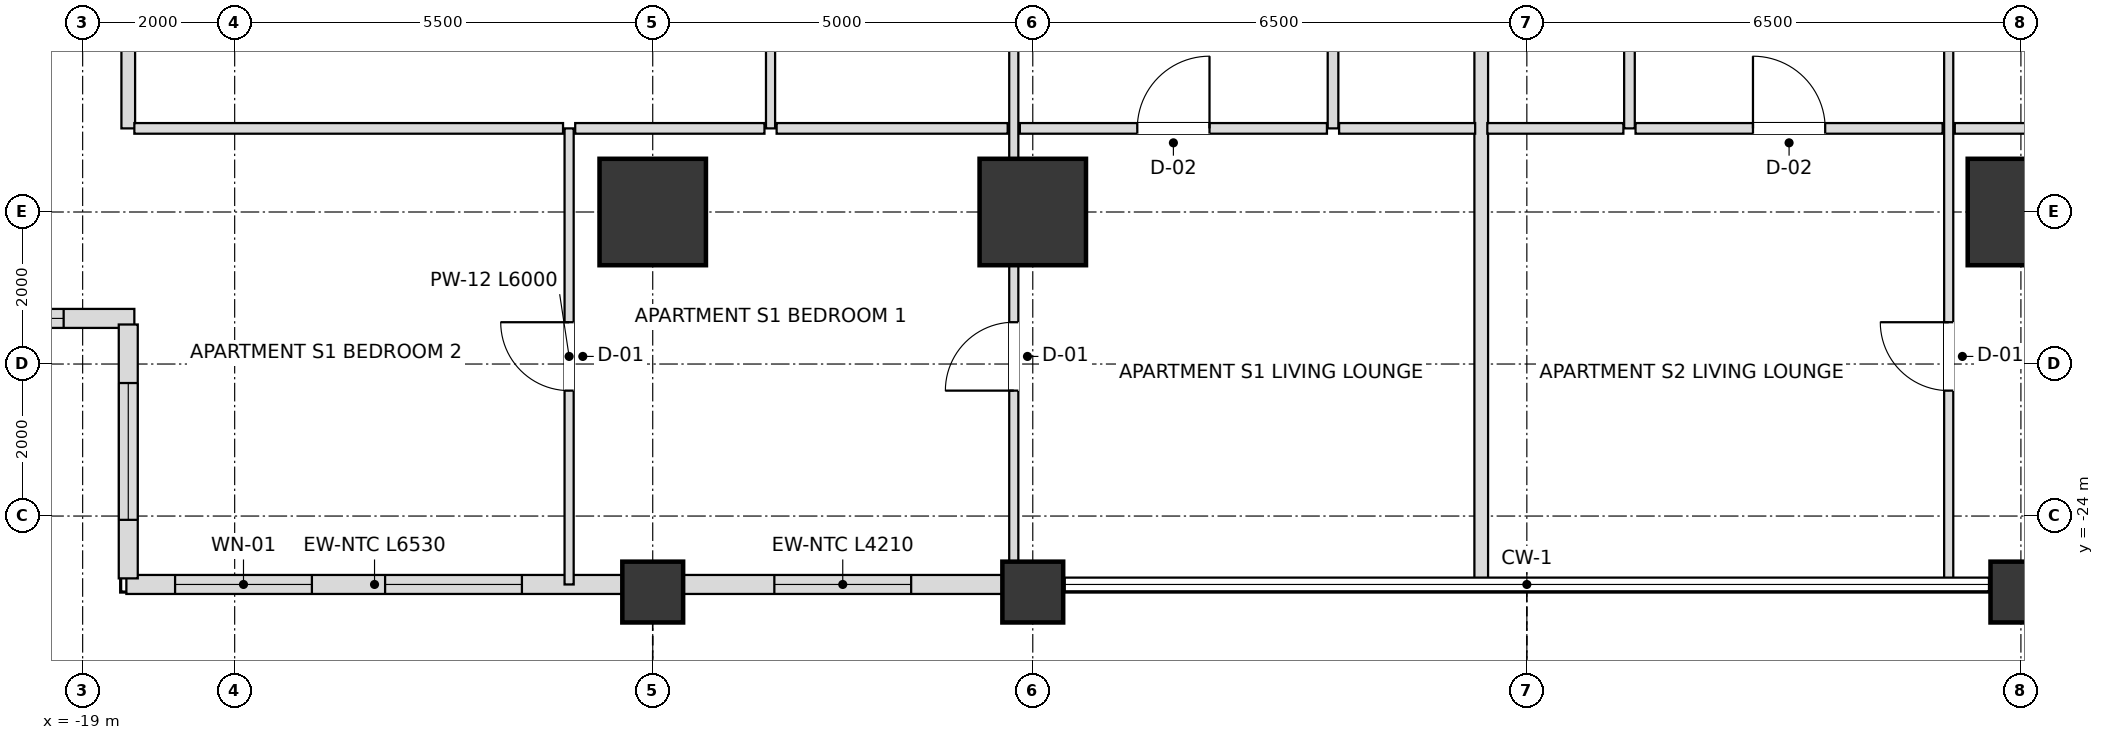
"""IFC4 building model, lengths in metres.
Left out: names, types, materials, properties, quantities, classifications, styles, units other than length and angle.
Written with IfcOpenShell. Run it as: python <this file> out.ifc"""

import sys

from ifc_helpers import new_model, si_unit, direction, frame, frame_2d, origin, origin_2d, place, context, subcontext, project, spatial, rectangle, extrude, element, fill, save


model = new_model("IFC4")
c1 = context("Model", 3, precision=1e-05, world=origin(), true_north=direction((0.0, 1.0)))
c2 = subcontext(c1, "Body", "Model", "MODEL_VIEW")
j1 = project(units=[si_unit("LENGTHUNIT", "METRE"), si_unit("PLANEANGLEUNIT", "RADIAN")], contexts=[c1])
p1 = place(None, origin())
s1 = spatial("IfcSite", under=j1, at=p1, CompositionType="ELEMENT")
p2 = place(p1, origin())
s2 = spatial("IfcBuilding", under=s1, at=p2, CompositionType="ELEMENT")
p3 = place(p2, frame((0.0, 0.0, 72.0)))
s3 = spatial("IfcBuildingStorey", under=s2, at=p3, CompositionType="ELEMENT", Elevation=72.0)
for number, where, z_axis, x_axis in (
    (1, (-11.5, -20.0, 0.0), (0.0, 0.0, 1.0), (1.0, 0.0, 0.0)),
    (2, (-6.5, -20.0, 0.0), (0.0, 0.0, 1.0), (1.0, 0.0, 0.0)),
    (3, (6.5, -20.0, 0.0), (0.0, 0.0, 1.0), (1.0, 0.0, 0.0)),
):
    element("IfcColumn", number, at=place(p3, frame(where, z_axis=z_axis, x_axis=x_axis)), inside=s3, PredefinedType="USERDEFINED", context=c2, shape_type="SweptSolid", body=[
        extrude(rectangle(XDim=1.4, YDim=1.4, at=origin_2d()), origin(), (0.0, 0.0, 1.0), 3.6),
    ])
for number, where, z_axis, x_axis in (
    (4, (-11.5, -25.0, 0.0), (0.0, 0.0, 1.0), (1.0, 0.0, 0.0)),
    (5, (-6.5, -25.0, 0.0), (0.0, 0.0, 1.0), (1.0, 0.0, 0.0)),
    (6, (6.5, -25.0, 0.0), (0.0, 0.0, 1.0), (1.0, 0.0, 0.0)),
):
    element("IfcColumn", number, at=place(p3, frame(where, z_axis=z_axis, x_axis=x_axis)), inside=s3, PredefinedType="COLUMN", context=c2, shape_type="SweptSolid", body=[
        extrude(rectangle(XDim=0.8, YDim=0.8, at=origin_2d()), origin(), (0.0, 0.0, 1.0), 3.6),
    ])
p4 = place(p3, frame((-18.425, -24.9, 0.0), z_axis=(0.0, 0.0, 1.0), x_axis=(1.0, 0.0, 0.0)))
e7 = element("IfcWall", 7, at=p4, inside=s3, PredefinedType="SOLIDWALL", context=c2, shape_type="SweptSolid", body=[
    extrude(rectangle(XDim=6.53, YDim=0.25, at=frame_2d((3.265, 0.0))), origin(), (0.0, 0.0, 1.0), 2.736),
])
p5 = place(p4, frame((0.641, 0.0, 0.72)))
e8 = element("IfcOpeningElement", 8, at=p5, cuts=e7, PredefinedType="OPENING", context=c2, shape_type="SweptSolid", body=[
    extrude(rectangle(XDim=1.8, YDim=1.68, at=frame_2d((0.9, 0.84))), frame((0.0, 0.135, 0.0), z_axis=(0.0, -1.0, 0.0), x_axis=(1.0, 0.0, 0.0)), (0.0, 0.0, 1.0), 0.27),
])
p6 = place(p4, frame((3.404, 0.0, 0.72)))
e9 = element("IfcOpeningElement", 9, at=p6, cuts=e7, PredefinedType="OPENING", context=c2, shape_type="SweptSolid", body=[
    extrude(rectangle(XDim=1.8, YDim=1.68, at=frame_2d((0.9, 0.84))), frame((0.0, 0.135, 0.0), z_axis=(0.0, -1.0, 0.0), x_axis=(1.0, 0.0, 0.0)), (0.0, 0.0, 1.0), 0.27),
])
p7 = place(p3, frame((-11.105, -24.9, 0.0), z_axis=(0.0, 0.0, 1.0), x_axis=(1.0, 0.0, 0.0)))
e10 = element("IfcWall", 10, at=p7, inside=s3, PredefinedType="SOLIDWALL", context=c2, shape_type="SweptSolid", body=[
    extrude(rectangle(XDim=4.21, YDim=0.25, at=frame_2d((2.105, 0.0))), origin(), (0.0, 0.0, 1.0), 2.736),
])
p8 = place(p7, frame((1.205, 0.0, 0.72)))
e11 = element("IfcOpeningElement", 11, at=p8, cuts=e10, PredefinedType="OPENING", context=c2, shape_type="SweptSolid", body=[
    extrude(rectangle(XDim=1.8, YDim=1.68, at=frame_2d((0.9, 0.84))), frame((0.0, 0.135, 0.0), z_axis=(0.0, -1.0, 0.0), x_axis=(1.0, 0.0, 0.0)), (0.0, 0.0, 1.0), 0.27),
])
p9 = place(p3, frame((-21.98, -21.4, 0.0), z_axis=(0.0, 0.0, 1.0), x_axis=(1.0, 0.0, 0.0)))
e12 = element("IfcWall", 12, at=p9, inside=s3, PredefinedType="SOLIDWALL", context=c2, shape_type="SweptSolid", body=[
    extrude(rectangle(XDim=3.66, YDim=0.25, at=frame_2d((1.83, 0.0))), origin(), (0.0, 0.0, 1.0), 2.736),
])
p10 = place(p9, frame((0.93, 0.0, 0.72)))
e13 = element("IfcOpeningElement", 13, at=p10, cuts=e12, PredefinedType="OPENING", context=c2, shape_type="SweptSolid", body=[
    extrude(rectangle(XDim=1.8, YDim=1.68, at=frame_2d((0.9, 0.84))), frame((0.0, 0.135, 0.0), z_axis=(0.0, -1.0, 0.0), x_axis=(1.0, 0.0, 0.0)), (0.0, 0.0, 1.0), 0.27),
])
p11 = place(p3, frame((-18.4, -21.48, 0.0), z_axis=(0.0, 0.0, 1.0), x_axis=(0.0, -1.0, 0.0)))
e14 = element("IfcWall", 14, at=p11, inside=s3, PredefinedType="SOLIDWALL", context=c2, shape_type="SweptSolid", body=[
    extrude(rectangle(XDim=3.34, YDim=0.25, at=frame_2d((1.67, 0.0))), origin(), (0.0, 0.0, 1.0), 2.736),
])
p12 = place(p11, frame((0.77, 0.0, 0.72)))
e15 = element("IfcOpeningElement", 15, at=p12, cuts=e14, PredefinedType="OPENING", context=c2, shape_type="SweptSolid", body=[
    extrude(rectangle(XDim=1.8, YDim=1.68, at=frame_2d((0.9, 0.84))), frame((0.0, 0.135, 0.0), z_axis=(0.0, -1.0, 0.0), x_axis=(1.0, 0.0, 0.0)), (0.0, 0.0, 1.0), 0.27),
])
p13 = place(p3, frame((-18.4, -18.9, 0.0), z_axis=(0.0, 0.0, 1.0), x_axis=(0.0, 1.0, 0.0)))
e16 = element("IfcWall", 16, at=p13, inside=s3, PredefinedType="PARTITIONING", context=c2, shape_type="SweptSolid", body=[
    extrude(rectangle(XDim=9.6, YDim=0.18, at=frame_2d((4.8, 0.0))), origin(), (0.0, 0.0, 1.0), 2.736),
])
p14 = place(p3, frame((-12.6, -24.9, 0.0), z_axis=(0.0, 0.0, 1.0), x_axis=(0.0, 1.0, 0.0)))
e17 = element("IfcWall", 17, at=p14, inside=s3, PredefinedType="PARTITIONING", context=c2, shape_type="SweptSolid", body=[
    extrude(rectangle(XDim=6.0, YDim=0.12, at=frame_2d((3.0, 0.0))), origin(), (0.0, 0.0, 1.0), 2.736),
])
p15 = place(p14, frame((2.55, 0.0, 0.0)))
e18 = element("IfcOpeningElement", 18, at=p15, cuts=e17, PredefinedType="OPENING", context=c2, shape_type="SweptSolid", body=[
    extrude(rectangle(XDim=0.9, YDim=2.1, at=frame_2d((0.45, 1.05))), frame((0.0, 0.07, 0.0), z_axis=(0.0, -1.0, 0.0), x_axis=(1.0, 0.0, 0.0)), (0.0, 0.0, 1.0), 0.14),
])
p16 = place(p3, frame((-9.95, -18.9, 0.0), z_axis=(0.0, 0.0, 1.0), x_axis=(0.0, 1.0, 0.0)))
e19 = element("IfcWall", 19, at=p16, inside=s3, PredefinedType="PARTITIONING", context=c2, shape_type="SweptSolid", body=[
    extrude(rectangle(XDim=9.6, YDim=0.12, at=frame_2d((4.8, 0.0))), origin(), (0.0, 0.0, 1.0), 2.816),
])
p17 = place(p16, frame((4.35, 0.0, 0.0)))
e20 = element("IfcOpeningElement", 20, at=p17, cuts=e19, PredefinedType="OPENING", context=c2, shape_type="SweptSolid", body=[
    extrude(rectangle(XDim=0.9, YDim=2.1, at=frame_2d((0.45, 1.05))), frame((0.0, 0.07, 0.0), z_axis=(0.0, -1.0, 0.0), x_axis=(1.0, 0.0, 0.0)), (0.0, 0.0, 1.0), 0.14),
])
p18 = place(p3, frame((-6.75, -24.9, 0.0), z_axis=(0.0, 0.0, 1.0), x_axis=(0.0, 1.0, 0.0)))
e21 = element("IfcWall", 21, at=p18, inside=s3, PredefinedType="PARTITIONING", context=c2, shape_type="SweptSolid", body=[
    extrude(rectangle(XDim=15.6, YDim=0.12, at=frame_2d((7.8, 0.0))), origin(), (0.0, 0.0, 1.0), 2.816),
])
p19 = place(p18, frame((10.325, 0.0, 0.0)))
e22 = element("IfcOpeningElement", 22, at=p19, cuts=e21, PredefinedType="OPENING", context=c2, shape_type="SweptSolid", body=[
    extrude(rectangle(XDim=0.95, YDim=2.1, at=frame_2d((0.475, 1.05))), frame((0.0, 0.07, 0.0), z_axis=(0.0, -1.0, 0.0), x_axis=(1.0, 0.0, 0.0)), (0.0, 0.0, 1.0), 0.14),
])
p20 = place(p18, frame((2.55, 0.0, 0.0)))
e23 = element("IfcOpeningElement", 23, at=p20, cuts=e21, PredefinedType="OPENING", context=c2, shape_type="SweptSolid", body=[
    extrude(rectangle(XDim=0.9, YDim=2.1, at=frame_2d((0.45, 1.05))), frame((0.0, 0.07, 0.0), z_axis=(0.0, -1.0, 0.0), x_axis=(1.0, 0.0, 0.0)), (0.0, 0.0, 1.0), 0.14),
])
p21 = place(p3, frame((-2.55, -18.9, 0.0), z_axis=(0.0, 0.0, 1.0), x_axis=(0.0, 1.0, 0.0)))
e24 = element("IfcWall", 24, at=p21, inside=s3, PredefinedType="PARTITIONING", context=c2, shape_type="SweptSolid", body=[
    extrude(rectangle(XDim=9.6, YDim=0.14, at=frame_2d((4.8, 0.0))), origin(), (0.0, 0.0, 1.0), 2.948),
])
p22 = place(p21, frame((4.35, 0.0, 0.0)))
e25 = element("IfcOpeningElement", 25, at=p22, cuts=e24, PredefinedType="OPENING", context=c2, shape_type="SweptSolid", body=[
    extrude(rectangle(XDim=0.9, YDim=2.1, at=frame_2d((0.45, 1.05))), frame((0.0, 0.08, 0.0), z_axis=(0.0, -1.0, 0.0), x_axis=(1.0, 0.0, 0.0)), (0.0, 0.0, 1.0), 0.16),
])
p23 = place(p3, frame((-0.6, -24.9, 0.0), z_axis=(0.0, 0.0, 1.0), x_axis=(0.0, 1.0, 0.0)))
e26 = element("IfcWall", 26, at=p23, inside=s3, PredefinedType="PARTITIONING", context=c2, shape_type="SweptSolid", body=[
    extrude(rectangle(XDim=15.6, YDim=0.18, at=frame_2d((7.8, 0.0))), origin(), (0.0, 0.0, 1.0), 2.816),
])
p24 = place(p3, frame((1.35, -18.9, 0.0), z_axis=(0.0, 0.0, 1.0), x_axis=(0.0, 1.0, 0.0)))
e27 = element("IfcWall", 27, at=p24, inside=s3, PredefinedType="PARTITIONING", context=c2, shape_type="SweptSolid", body=[
    extrude(rectangle(XDim=9.6, YDim=0.14, at=frame_2d((4.8, 0.0))), origin(), (0.0, 0.0, 1.0), 2.948),
])
p25 = place(p24, frame((4.35, 0.0, 0.0)))
e28 = element("IfcOpeningElement", 28, at=p25, cuts=e27, PredefinedType="OPENING", context=c2, shape_type="SweptSolid", body=[
    extrude(rectangle(XDim=0.9, YDim=2.1, at=frame_2d((0.45, 1.05))), frame((0.0, 0.08, 0.0), z_axis=(0.0, -1.0, 0.0), x_axis=(1.0, 0.0, 0.0)), (0.0, 0.0, 1.0), 0.16),
])
p26 = place(p3, frame((5.55, -24.9, 0.0), z_axis=(0.0, 0.0, 1.0), x_axis=(0.0, 1.0, 0.0)))
e29 = element("IfcWall", 29, at=p26, inside=s3, PredefinedType="PARTITIONING", context=c2, shape_type="SweptSolid", body=[
    extrude(rectangle(XDim=15.6, YDim=0.12, at=frame_2d((7.8, 0.0))), origin(), (0.0, 0.0, 1.0), 2.816),
])
p27 = place(p26, frame((10.325, 0.0, 0.0)))
e30 = element("IfcOpeningElement", 30, at=p27, cuts=e29, PredefinedType="OPENING", context=c2, shape_type="SweptSolid", body=[
    extrude(rectangle(XDim=0.95, YDim=2.1, at=frame_2d((0.475, 1.05))), frame((0.0, 0.07, 0.0), z_axis=(0.0, -1.0, 0.0), x_axis=(1.0, 0.0, 0.0)), (0.0, 0.0, 1.0), 0.14),
])
p28 = place(p26, frame((2.55, 0.0, 0.0)))
e31 = element("IfcOpeningElement", 31, at=p28, cuts=e29, PredefinedType="OPENING", context=c2, shape_type="SweptSolid", body=[
    extrude(rectangle(XDim=0.9, YDim=2.1, at=frame_2d((0.45, 1.05))), frame((0.0, 0.07, 0.0), z_axis=(0.0, -1.0, 0.0), x_axis=(1.0, 0.0, 0.0)), (0.0, 0.0, 1.0), 0.14),
])
p29 = place(p3, frame((-18.32, -18.9, 0.0), z_axis=(0.0, 0.0, 1.0), x_axis=(1.0, 0.0, 0.0)))
e32 = element("IfcWall", 32, at=p29, inside=s3, PredefinedType="PARTITIONING", context=c2, shape_type="SweptSolid", body=[
    extrude(rectangle(XDim=5.64, YDim=0.14, at=frame_2d((2.82, 0.0))), origin(), (0.0, 0.0, 1.0), 2.736),
])
p30 = place(p3, frame((-12.52, -18.9, 0.0), z_axis=(0.0, 0.0, 1.0), x_axis=(1.0, 0.0, 0.0)))
e33 = element("IfcWall", 33, at=p30, inside=s3, PredefinedType="PARTITIONING", context=c2, shape_type="SweptSolid", body=[
    extrude(rectangle(XDim=2.49, YDim=0.14, at=frame_2d((1.245, 0.0))), origin(), (0.0, 0.0, 1.0), 2.736),
])
p31 = place(p3, frame((-9.87, -18.9, 0.0), z_axis=(0.0, 0.0, 1.0), x_axis=(1.0, 0.0, 0.0)))
e34 = element("IfcWall", 34, at=p31, inside=s3, PredefinedType="PARTITIONING", context=c2, shape_type="SweptSolid", body=[
    extrude(rectangle(XDim=3.04, YDim=0.14, at=frame_2d((1.52, 0.0))), origin(), (0.0, 0.0, 1.0), 3.38),
])
p32 = place(p3, frame((-6.67, -18.9, 0.0), z_axis=(0.0, 0.0, 1.0), x_axis=(1.0, 0.0, 0.0)))
e35 = element("IfcWall", 35, at=p32, inside=s3, PredefinedType="PARTITIONING", context=c2, shape_type="SweptSolid", body=[
    extrude(rectangle(XDim=4.04, YDim=0.14, at=frame_2d((2.02, 0.0))), origin(), (0.0, 0.0, 1.0), 2.816),
])
p33 = place(p32, frame((1.545, 0.0, 0.0)))
e36 = element("IfcOpeningElement", 36, at=p33, cuts=e35, PredefinedType="OPENING", context=c2, shape_type="SweptSolid", body=[
    extrude(rectangle(XDim=0.95, YDim=2.1, at=frame_2d((0.475, 1.05))), frame((0.0, 0.08, 0.0), z_axis=(0.0, -1.0, 0.0), x_axis=(1.0, 0.0, 0.0)), (0.0, 0.0, 1.0), 0.16),
])
for number, where, z_axis, x_axis in (
    (37, (-2.47, -18.9, 0.0), (0.0, 0.0, 1.0), (1.0, 0.0, 0.0)),
    (38, (-0.52, -18.9, 0.0), (0.0, 0.0, 1.0), (1.0, 0.0, 0.0)),
):
    element("IfcWall", number, at=place(p3, frame(where, z_axis=z_axis, x_axis=x_axis)), inside=s3, PredefinedType="PARTITIONING", context=c2, shape_type="SweptSolid", body=[
        extrude(rectangle(XDim=1.79, YDim=0.14, at=frame_2d((0.895, 0.0))), origin(), (0.0, 0.0, 1.0), 3.38),
    ])
p34 = place(p3, frame((1.43, -18.9, 0.0), z_axis=(0.0, 0.0, 1.0), x_axis=(1.0, 0.0, 0.0)))
e39 = element("IfcWall", 39, at=p34, inside=s3, PredefinedType="PARTITIONING", context=c2, shape_type="SweptSolid", body=[
    extrude(rectangle(XDim=4.04, YDim=0.14, at=frame_2d((2.02, 0.0))), origin(), (0.0, 0.0, 1.0), 3.38),
])
p35 = place(p34, frame((1.545, 0.0, 0.0)))
e40 = element("IfcOpeningElement", 40, at=p35, cuts=e39, PredefinedType="OPENING", context=c2, shape_type="SweptSolid", body=[
    extrude(rectangle(XDim=0.95, YDim=2.1, at=frame_2d((0.475, 1.05))), frame((0.0, 0.08, 0.0), z_axis=(0.0, -1.0, 0.0), x_axis=(1.0, 0.0, 0.0)), (0.0, 0.0, 1.0), 0.16),
])
p36 = place(p3, frame((5.63, -18.9, 0.0), z_axis=(0.0, 0.0, 1.0), x_axis=(1.0, 0.0, 0.0)))
e41 = element("IfcWall", 41, at=p36, inside=s3, PredefinedType="PARTITIONING", context=c2, shape_type="SweptSolid", body=[
    extrude(rectangle(XDim=3.04, YDim=0.14, at=frame_2d((1.52, 0.0))), origin(), (0.0, 0.0, 1.0), 2.816),
])
p37 = place(p5, origin())
e42 = element("IfcWindow", 42, at=p37, inside=s3, PartitioningType="SINGLE_PANEL", PredefinedType="WINDOW", context=c2, shape_type="SweptSolid", body=[
    extrude(rectangle(XDim=1.8, YDim=1.68, at=frame_2d((0.9, 0.84))), frame((0.0, 0.03, 0.0), z_axis=(0.0, -1.0, 0.0), x_axis=(1.0, 0.0, 0.0)), (0.0, 0.0, 1.0), 0.06),
])
fill(e8, e42)
p38 = place(p6, origin())
e43 = element("IfcWindow", 43, at=p38, inside=s3, PartitioningType="SINGLE_PANEL", PredefinedType="WINDOW", context=c2, shape_type="SweptSolid", body=[
    extrude(rectangle(XDim=1.8, YDim=1.68, at=frame_2d((0.9, 0.84))), frame((0.0, 0.03, 0.0), z_axis=(0.0, -1.0, 0.0), x_axis=(1.0, 0.0, 0.0)), (0.0, 0.0, 1.0), 0.06),
])
fill(e9, e43)
p39 = place(p8, origin())
e44 = element("IfcWindow", 44, at=p39, inside=s3, PartitioningType="SINGLE_PANEL", PredefinedType="WINDOW", context=c2, shape_type="SweptSolid", body=[
    extrude(rectangle(XDim=1.8, YDim=1.68, at=frame_2d((0.9, 0.84))), frame((0.0, 0.03, 0.0), z_axis=(0.0, -1.0, 0.0), x_axis=(1.0, 0.0, 0.0)), (0.0, 0.0, 1.0), 0.06),
])
fill(e11, e44)
p40 = place(p10, origin())
e45 = element("IfcWindow", 45, at=p40, inside=s3, PartitioningType="SINGLE_PANEL", PredefinedType="WINDOW", context=c2, shape_type="SweptSolid", body=[
    extrude(rectangle(XDim=1.8, YDim=1.68, at=frame_2d((0.9, 0.84))), frame((0.0, 0.03, 0.0), z_axis=(0.0, -1.0, 0.0), x_axis=(1.0, 0.0, 0.0)), (0.0, 0.0, 1.0), 0.06),
])
fill(e13, e45)
p41 = place(p12, origin())
e46 = element("IfcWindow", 46, at=p41, inside=s3, PartitioningType="SINGLE_PANEL", PredefinedType="WINDOW", context=c2, shape_type="SweptSolid", body=[
    extrude(rectangle(XDim=1.8, YDim=1.68, at=frame_2d((0.9, 0.84))), frame((0.0, 0.03, 0.0), z_axis=(0.0, -1.0, 0.0), x_axis=(1.0, 0.0, 0.0)), (0.0, 0.0, 1.0), 0.06),
])
fill(e15, e46)
p42 = place(p33, origin())
e47 = element("IfcDoor", 47, at=p42, inside=s3, OperationType="SINGLE_SWING_RIGHT", PredefinedType="DOOR", context=c2, shape_type="SweptSolid", body=[
    extrude(rectangle(XDim=0.95, YDim=2.1, at=frame_2d((0.475, 1.05))), frame((0.0, 0.025, 0.0), z_axis=(0.0, -1.0, 0.0), x_axis=(1.0, 0.0, 0.0)), (0.0, 0.0, 1.0), 0.05),
])
fill(e36, e47)
p43 = place(p20, origin())
e48 = element("IfcDoor", 48, at=p43, inside=s3, OperationType="SINGLE_SWING_LEFT", PredefinedType="DOOR", context=c2, shape_type="SweptSolid", body=[
    extrude(rectangle(XDim=0.9, YDim=2.1, at=frame_2d((0.45, 1.05))), frame((0.0, 0.025, 0.0), z_axis=(0.0, -1.0, 0.0), x_axis=(1.0, 0.0, 0.0)), (0.0, 0.0, 1.0), 0.05),
])
fill(e23, e48)
p44 = place(p15, origin())
e49 = element("IfcDoor", 49, at=p44, inside=s3, OperationType="SINGLE_SWING_RIGHT", PredefinedType="DOOR", context=c2, shape_type="SweptSolid", body=[
    extrude(rectangle(XDim=0.9, YDim=2.1, at=frame_2d((0.45, 1.05))), frame((0.0, 0.025, 0.0), z_axis=(0.0, -1.0, 0.0), x_axis=(1.0, 0.0, 0.0)), (0.0, 0.0, 1.0), 0.05),
])
fill(e18, e49)
p45 = place(p35, origin())
e50 = element("IfcDoor", 50, at=p45, inside=s3, OperationType="SINGLE_SWING_LEFT", PredefinedType="DOOR", context=c2, shape_type="SweptSolid", body=[
    extrude(rectangle(XDim=0.95, YDim=2.1, at=frame_2d((0.475, 1.05))), frame((0.0, 0.025, 0.0), z_axis=(0.0, -1.0, 0.0), x_axis=(1.0, 0.0, 0.0)), (0.0, 0.0, 1.0), 0.05),
])
fill(e40, e50)
p46 = place(p28, origin())
e51 = element("IfcDoor", 51, at=p46, inside=s3, OperationType="SINGLE_SWING_RIGHT", PredefinedType="DOOR", context=c2, shape_type="SweptSolid", body=[
    extrude(rectangle(XDim=0.9, YDim=2.1, at=frame_2d((0.45, 1.05))), frame((0.0, 0.025, 0.0), z_axis=(0.0, -1.0, 0.0), x_axis=(1.0, 0.0, 0.0)), (0.0, 0.0, 1.0), 0.05),
])
fill(e31, e51)
save(model, sys.argv[1])
